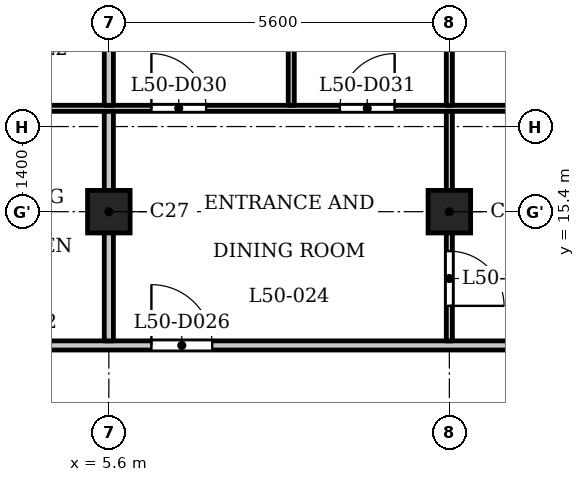
"""IFC4 building model, lengths in metres.
Left out: names, types, materials, properties, quantities, classifications, styles, units other than length and angle.
Written with IfcOpenShell. Run it as: python <this file> out.ifc"""

import sys

from ifc_helpers import new_model, si_unit, direction, frame, frame_2d, origin, origin_2d, place, context, subcontext, project, spatial, rectangle, extrude, element, fill, save


model = new_model("IFC4")
c1 = context("Model", 3, precision=1e-05, world=origin(), true_north=direction((0.0, 1.0)))
c2 = subcontext(c1, "Body", "Model", "MODEL_VIEW")
j1 = project(units=[si_unit("LENGTHUNIT", "METRE"), si_unit("PLANEANGLEUNIT", "RADIAN")], contexts=[c1])
p1 = place(None, origin())
s1 = spatial("IfcSite", under=j1, at=p1, CompositionType="ELEMENT")
p2 = place(p1, origin())
s2 = spatial("IfcBuilding", under=s1, at=p2, CompositionType="ELEMENT")
p3 = place(p2, frame((0.0, 0.0, 195.9)))
s3 = spatial("IfcBuildingStorey", under=s2, at=p3, CompositionType="ELEMENT", Elevation=195.9)
for number, where, z_axis, x_axis in (
    (1, (5.6, 15.4, 0.0), (0.0, 0.0, 1.0), (1.0, 0.0, 0.0)),
    (2, (11.2, 15.4, 0.0), (0.0, 0.0, 1.0), (1.0, 0.0, 0.0)),
):
    element("IfcColumn", number, at=place(p3, frame(where, z_axis=z_axis, x_axis=x_axis)), inside=s3, PredefinedType="COLUMN", context=c2, shape_type="SweptSolid", body=[
        extrude(rectangle(XDim=0.7, YDim=0.7, at=origin_2d()), origin(), (0.0, 0.0, 1.0), 3.5),
    ])
p4 = place(p3, frame((-17.4, 13.2, 0.0), z_axis=(0.0, 0.0, 1.0), x_axis=(1.0, 0.0, 0.0)))
e3 = element("IfcWall", 3, at=p4, inside=s3, PredefinedType="PARTITIONING", context=c2, shape_type="SweptSolid", body=[
    extrude(rectangle(XDim=34.8, YDim=0.15, at=frame_2d((17.4, 0.0))), origin(), (0.0, 0.0, 1.0), 3.2),
])
p5 = place(p4, frame((0.25, 0.0, 0.0)))
e4 = element("IfcOpeningElement", 4, at=p5, cuts=e3, PredefinedType="OPENING", context=c2, shape_type="SweptSolid", body=[
    extrude(rectangle(XDim=1.0, YDim=2.1, at=frame_2d((0.5, 1.05))), frame((0.0, 0.085, 0.0), z_axis=(0.0, -1.0, 0.0), x_axis=(1.0, 0.0, 0.0)), (0.0, 0.0, 1.0), 0.17),
])
p6 = place(p4, frame((33.65, 0.0, 0.0)))
e5 = element("IfcOpeningElement", 5, at=p6, cuts=e3, PredefinedType="OPENING", context=c2, shape_type="SweptSolid", body=[
    extrude(rectangle(XDim=1.0, YDim=2.1, at=frame_2d((0.5, 1.05))), frame((0.0, 0.085, 0.0), z_axis=(0.0, -1.0, 0.0), x_axis=(1.0, 0.0, 0.0)), (0.0, 0.0, 1.0), 0.17),
])
p7 = place(p4, frame((10.15, 0.0, 0.0)))
e6 = element("IfcOpeningElement", 6, at=p7, cuts=e3, PredefinedType="OPENING", context=c2, shape_type="SweptSolid", body=[
    extrude(rectangle(XDim=1.0, YDim=2.1, at=frame_2d((0.5, 1.05))), frame((0.0, 0.085, 0.0), z_axis=(0.0, -1.0, 0.0), x_axis=(1.0, 0.0, 0.0)), (0.0, 0.0, 1.0), 0.17),
])
p8 = place(p4, frame((13.55, 0.0, 0.0)))
e7 = element("IfcOpeningElement", 7, at=p8, cuts=e3, PredefinedType="OPENING", context=c2, shape_type="SweptSolid", body=[
    extrude(rectangle(XDim=1.0, YDim=2.1, at=frame_2d((0.5, 1.05))), frame((0.0, 0.085, 0.0), z_axis=(0.0, -1.0, 0.0), x_axis=(1.0, 0.0, 0.0)), (0.0, 0.0, 1.0), 0.17),
])
p9 = place(p4, frame((20.85, 0.0, 0.0)))
e8 = element("IfcOpeningElement", 8, at=p9, cuts=e3, PredefinedType="OPENING", context=c2, shape_type="SweptSolid", body=[
    extrude(rectangle(XDim=1.0, YDim=2.1, at=frame_2d((0.5, 1.05))), frame((0.0, 0.085, 0.0), z_axis=(0.0, -1.0, 0.0), x_axis=(1.0, 0.0, 0.0)), (0.0, 0.0, 1.0), 0.17),
])
p10 = place(p4, frame((23.7, 0.0, 0.0)))
e9 = element("IfcOpeningElement", 9, at=p10, cuts=e3, PredefinedType="OPENING", context=c2, shape_type="SweptSolid", body=[
    extrude(rectangle(XDim=1.0, YDim=2.1, at=frame_2d((0.5, 1.05))), frame((0.0, 0.085, 0.0), z_axis=(0.0, -1.0, 0.0), x_axis=(1.0, 0.0, 0.0)), (0.0, 0.0, 1.0), 0.17),
])
p11 = place(p3, frame((-16.725, 17.1, 0.0), z_axis=(0.0, 0.0, 1.0), x_axis=(1.0, 0.0, 0.0)))
e10 = element("IfcWall", 10, at=p11, inside=s3, PredefinedType="PARTITIONING", context=c2, shape_type="SweptSolid", body=[
    extrude(rectangle(XDim=33.45, YDim=0.1, at=frame_2d((16.725, 0.0))), origin(), (0.0, 0.0, 1.0), 3.2),
])
p12 = place(p11, frame((4.075, 0.0, 0.0)))
e11 = element("IfcOpeningElement", 11, at=p12, cuts=e10, PredefinedType="OPENING", context=c2, shape_type="SweptSolid", body=[
    extrude(rectangle(XDim=0.8, YDim=2.1, at=frame_2d((0.4, 1.05))), frame((0.0, 0.06, 0.0), z_axis=(0.0, -1.0, 0.0), x_axis=(1.0, 0.0, 0.0)), (0.0, 0.0, 1.0), 0.12),
])
p13 = place(p11, frame((9.575, 0.0, 0.0)))
e12 = element("IfcOpeningElement", 12, at=p13, cuts=e10, PredefinedType="OPENING", context=c2, shape_type="SweptSolid", body=[
    extrude(rectangle(XDim=0.9, YDim=2.1, at=frame_2d((0.45, 1.05))), frame((0.0, 0.06, 0.0), z_axis=(0.0, -1.0, 0.0), x_axis=(1.0, 0.0, 0.0)), (0.0, 0.0, 1.0), 0.12),
])
p14 = place(p11, frame((15.175, 0.0, 0.0)))
e13 = element("IfcOpeningElement", 13, at=p14, cuts=e10, PredefinedType="OPENING", context=c2, shape_type="SweptSolid", body=[
    extrude(rectangle(XDim=0.8, YDim=2.1, at=frame_2d((0.4, 1.05))), frame((0.0, 0.06, 0.0), z_axis=(0.0, -1.0, 0.0), x_axis=(1.0, 0.0, 0.0)), (0.0, 0.0, 1.0), 0.12),
])
p15 = place(p11, frame((12.975, 0.0, 0.0)))
e14 = element("IfcOpeningElement", 14, at=p15, cuts=e10, PredefinedType="OPENING", context=c2, shape_type="SweptSolid", body=[
    extrude(rectangle(XDim=0.9, YDim=2.1, at=frame_2d((0.45, 1.05))), frame((0.0, 0.06, 0.0), z_axis=(0.0, -1.0, 0.0), x_axis=(1.0, 0.0, 0.0)), (0.0, 0.0, 1.0), 0.12),
])
p16 = place(p11, frame((17.625, 0.0, 0.0)))
e15 = element("IfcOpeningElement", 15, at=p16, cuts=e10, PredefinedType="OPENING", context=c2, shape_type="SweptSolid", body=[
    extrude(rectangle(XDim=0.8, YDim=2.1, at=frame_2d((0.4, 1.05))), frame((0.0, 0.06, 0.0), z_axis=(0.0, -1.0, 0.0), x_axis=(1.0, 0.0, 0.0)), (0.0, 0.0, 1.0), 0.12),
])
p17 = place(p11, frame((20.025, 0.0, 0.0)))
e16 = element("IfcOpeningElement", 16, at=p17, cuts=e10, PredefinedType="OPENING", context=c2, shape_type="SweptSolid", body=[
    extrude(rectangle(XDim=0.9, YDim=2.1, at=frame_2d((0.45, 1.05))), frame((0.0, 0.06, 0.0), z_axis=(0.0, -1.0, 0.0), x_axis=(1.0, 0.0, 0.0)), (0.0, 0.0, 1.0), 0.12),
])
p18 = place(p11, frame((31.975, 0.0, 0.0)))
e17 = element("IfcOpeningElement", 17, at=p18, cuts=e10, PredefinedType="OPENING", context=c2, shape_type="SweptSolid", body=[
    extrude(rectangle(XDim=0.8, YDim=2.1, at=frame_2d((0.4, 1.05))), frame((0.0, 0.06, 0.0), z_axis=(0.0, -1.0, 0.0), x_axis=(1.0, 0.0, 0.0)), (0.0, 0.0, 1.0), 0.12),
])
p19 = place(p11, frame((29.775, 0.0, 0.0)))
e18 = element("IfcOpeningElement", 18, at=p19, cuts=e10, PredefinedType="OPENING", context=c2, shape_type="SweptSolid", body=[
    extrude(rectangle(XDim=0.9, YDim=2.1, at=frame_2d((0.45, 1.05))), frame((0.0, 0.06, 0.0), z_axis=(0.0, -1.0, 0.0), x_axis=(1.0, 0.0, 0.0)), (0.0, 0.0, 1.0), 0.12),
])
p20 = place(p11, frame((23.025, 0.0, 0.0)))
e19 = element("IfcOpeningElement", 19, at=p20, cuts=e10, PredefinedType="OPENING", context=c2, shape_type="SweptSolid", body=[
    extrude(rectangle(XDim=0.9, YDim=2.1, at=frame_2d((0.45, 1.05))), frame((0.0, 0.06, 0.0), z_axis=(0.0, -1.0, 0.0), x_axis=(1.0, 0.0, 0.0)), (0.0, 0.0, 1.0), 0.12),
])
p21 = place(p11, frame((26.125, 0.0, 0.0)))
e20 = element("IfcOpeningElement", 20, at=p21, cuts=e10, PredefinedType="OPENING", context=c2, shape_type="SweptSolid", body=[
    extrude(rectangle(XDim=0.9, YDim=2.1, at=frame_2d((0.45, 1.05))), frame((0.0, 0.06, 0.0), z_axis=(0.0, -1.0, 0.0), x_axis=(1.0, 0.0, 0.0)), (0.0, 0.0, 1.0), 0.12),
])
p22 = place(p3, frame((5.6, 13.275, 0.0), z_axis=(0.0, 0.0, 1.0), x_axis=(0.0, 1.0, 0.0)))
e21 = element("IfcWall", 21, at=p22, inside=s3, PredefinedType="PARTITIONING", context=c2, shape_type="SweptSolid", body=[
    extrude(rectangle(XDim=3.775, YDim=0.15, at=frame_2d((1.888, 0.0))), origin(), (0.0, 0.0, 1.0), 3.2),
])
p23 = place(p3, frame((5.6, 17.15, 0.0), z_axis=(0.0, 0.0, 1.0), x_axis=(0.0, 1.0, 0.0)))
e22 = element("IfcWall", 22, at=p23, inside=s3, PredefinedType="PARTITIONING", context=c2, shape_type="SweptSolid", body=[
    extrude(rectangle(XDim=4.93, YDim=0.15, at=frame_2d((2.465, 0.0))), origin(), (0.0, 0.0, 1.0), 3.2),
])
p24 = place(p3, frame((8.6, 17.15, 0.0), z_axis=(0.0, 0.0, 1.0), x_axis=(0.0, 1.0, 0.0)))
e23 = element("IfcWall", 23, at=p24, inside=s3, PredefinedType="PARTITIONING", context=c2, shape_type="SweptSolid", body=[
    extrude(rectangle(XDim=5.68, YDim=0.1, at=frame_2d((2.84, 0.0))), origin(), (0.0, 0.0, 1.0), 3.2),
])
p25 = place(p3, frame((11.2, 13.275, 0.0), z_axis=(0.0, 0.0, 1.0), x_axis=(0.0, 1.0, 0.0)))
e24 = element("IfcWall", 24, at=p25, inside=s3, PredefinedType="PARTITIONING", context=c2, shape_type="SweptSolid", body=[
    extrude(rectangle(XDim=3.775, YDim=0.1, at=frame_2d((1.888, 0.0))), origin(), (0.0, 0.0, 1.0), 3.2),
])
p26 = place(p25, frame((0.576, 0.0, 0.0)))
e25 = element("IfcOpeningElement", 25, at=p26, cuts=e24, PredefinedType="OPENING", context=c2, shape_type="SweptSolid", body=[
    extrude(rectangle(XDim=0.9, YDim=2.1, at=frame_2d((0.45, 1.05))), frame((0.0, 0.06, 0.0), z_axis=(0.0, -1.0, 0.0), x_axis=(1.0, 0.0, 0.0)), (0.0, 0.0, 1.0), 0.12),
])
p27 = place(p3, frame((11.2, 17.15, 0.0), z_axis=(0.0, 0.0, 1.0), x_axis=(0.0, 1.0, 0.0)))
e26 = element("IfcWall", 26, at=p27, inside=s3, PredefinedType="PARTITIONING", context=c2, shape_type="SweptSolid", body=[
    extrude(rectangle(XDim=4.93, YDim=0.1, at=frame_2d((2.465, 0.0))), origin(), (0.0, 0.0, 1.0), 3.2),
])
p28 = place(p10, origin())
e27 = element("IfcDoor", 27, at=p28, inside=s3, OperationType="SINGLE_SWING_RIGHT", PredefinedType="DOOR", context=c2, shape_type="SweptSolid", body=[
    extrude(rectangle(XDim=1.0, YDim=2.1, at=frame_2d((0.5, 1.05))), frame((0.0, 0.025, 0.0), z_axis=(0.0, -1.0, 0.0), x_axis=(1.0, 0.0, 0.0)), (0.0, 0.0, 1.0), 0.05),
])
fill(e9, e27)
p29 = place(p26, origin())
e28 = element("IfcDoor", 28, at=p29, inside=s3, OperationType="SINGLE_SWING_LEFT", PredefinedType="DOOR", context=c2, shape_type="SweptSolid", body=[
    extrude(rectangle(XDim=0.9, YDim=2.1, at=frame_2d((0.45, 1.05))), frame((0.0, 0.025, 0.0), z_axis=(0.0, -1.0, 0.0), x_axis=(1.0, 0.0, 0.0)), (0.0, 0.0, 1.0), 0.05),
])
fill(e25, e28)
p30 = place(p20, origin())
e29 = element("IfcDoor", 29, at=p30, inside=s3, OperationType="SINGLE_SWING_RIGHT", PredefinedType="DOOR", context=c2, shape_type="SweptSolid", body=[
    extrude(rectangle(XDim=0.9, YDim=2.1, at=frame_2d((0.45, 1.05))), frame((0.0, 0.025, 0.0), z_axis=(0.0, -1.0, 0.0), x_axis=(1.0, 0.0, 0.0)), (0.0, 0.0, 1.0), 0.05),
])
fill(e19, e29)
p31 = place(p21, origin())
e30 = element("IfcDoor", 30, at=p31, inside=s3, OperationType="SINGLE_SWING_LEFT", PredefinedType="DOOR", context=c2, shape_type="SweptSolid", body=[
    extrude(rectangle(XDim=0.9, YDim=2.1, at=frame_2d((0.45, 1.05))), frame((0.0, 0.025, 0.0), z_axis=(0.0, -1.0, 0.0), x_axis=(1.0, 0.0, 0.0)), (0.0, 0.0, 1.0), 0.05),
])
fill(e20, e30)
save(model, sys.argv[1])
